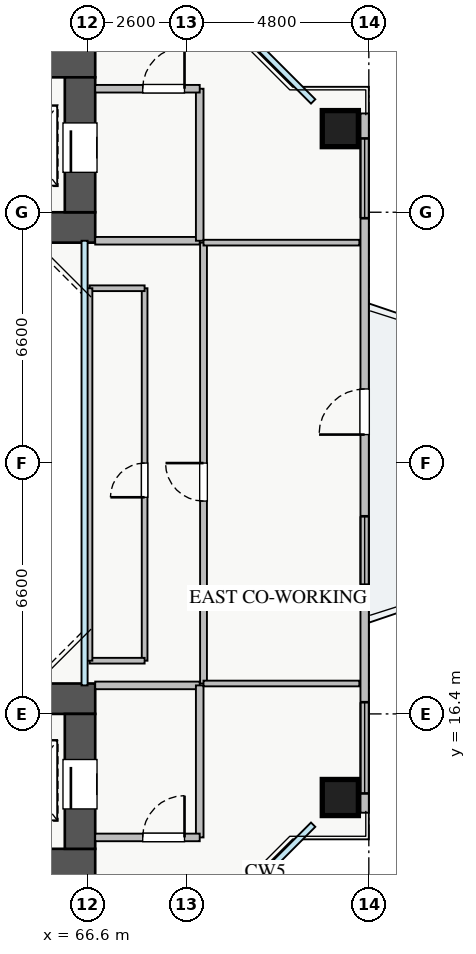
"""IFC4 building model, lengths in metres.
Left out: names, types, materials, properties, quantities, classifications, styles, units other than length and angle.
Written with IfcOpenShell. Run it as: python <this file> out.ifc"""

import sys

from ifc_helpers import new_model, si_unit, direction, frame, frame_2d, origin, origin_2d, place, context, subcontext, project, spatial, rectangle, extrude, source, transform, mapped, element, fill, save


model = new_model("IFC4")
c1 = context("Model", 3, precision=1e-05, world=origin(), true_north=direction((0.0, 1.0)))
c2 = subcontext(c1, "Body", "Model", "MODEL_VIEW")
j1 = project(units=[si_unit("LENGTHUNIT", "METRE"), si_unit("PLANEANGLEUNIT", "RADIAN")], contexts=[c1])
p1 = place(None, origin())
s1 = spatial("IfcSite", under=j1, at=p1, CompositionType="ELEMENT")
p2 = place(p1, origin())
s2 = spatial("IfcBuilding", under=s1, at=p2, CompositionType="ELEMENT")
p3 = place(p2, frame((0.0, 0.0, 66.5)))
s3 = spatial("IfcBuildingStorey", under=s2, at=p3, CompositionType="ELEMENT", Elevation=66.5)
p4 = place(p3, frame((54.2, 29.2, 0.0), z_axis=(0.0, 0.0, 1.0), x_axis=(1.0, 0.0, 0.0)))
e1 = element("IfcWall", 1, at=p4, inside=s3, PredefinedType="SHEAR", context=c2, shape_type="SweptSolid", body=[
    extrude(rectangle(XDim=12.6, YDim=0.8, at=frame_2d((6.3, 0.0))), origin(), (0.0, 0.0, 1.0), 3.25),
])
p5 = place(p3, frame((54.2, 33.55, 0.0), z_axis=(0.0, 0.0, 1.0), x_axis=(1.0, 0.0, 0.0)))
e2 = element("IfcWall", 2, at=p5, inside=s3, PredefinedType="SHEAR", context=c2, shape_type="SweptSolid", body=[
    extrude(rectangle(XDim=12.6, YDim=0.8, at=frame_2d((6.3, 0.0))), origin(), (0.0, 0.0, 1.0), 3.25),
])
p6 = place(p5, frame((8.2, 0.0, 0.0)))
e3 = element("IfcOpeningElement", 3, at=p6, cuts=e2, PredefinedType="OPENING", context=c2, shape_type="SweptSolid", body=[
    extrude(rectangle(XDim=1.1, YDim=2.05, at=frame_2d((0.55, 1.025))), frame((0.0, 0.41, 0.0), z_axis=(0.0, -1.0, 0.0), x_axis=(1.0, 0.0, 0.0)), (0.0, 0.0, 1.0), 0.82),
])
p7 = place(p3, frame((66.4, 29.6, 0.0), z_axis=(0.0, 0.0, 1.0), x_axis=(0.0, 1.0, 0.0)))
e4 = element("IfcWall", 4, at=p7, inside=s3, PredefinedType="SHEAR", context=c2, shape_type="SweptSolid", body=[
    extrude(rectangle(XDim=3.55, YDim=0.8, at=frame_2d((1.775, 0.0))), origin(), (0.0, 0.0, 1.0), 3.25),
])
p8 = place(p7, frame((1.05, 0.0, 0.0)))
e5 = element("IfcOpeningElement", 5, at=p8, cuts=e4, PredefinedType="OPENING", context=c2, shape_type="SweptSolid", body=[
    extrude(rectangle(XDim=1.3, YDim=2.05, at=frame_2d((0.65, 1.025))), frame((0.0, 0.41, 0.0), z_axis=(0.0, -1.0, 0.0), x_axis=(1.0, 0.0, 0.0)), (0.0, 0.0, 1.0), 0.82),
])
p9 = place(p3, frame((54.2, 12.45, 0.0), z_axis=(0.0, 0.0, 1.0), x_axis=(1.0, 0.0, 0.0)))
e6 = element("IfcWall", 6, at=p9, inside=s3, PredefinedType="SHEAR", context=c2, shape_type="SweptSolid", body=[
    extrude(rectangle(XDim=12.6, YDim=0.8, at=frame_2d((6.3, 0.0))), origin(), (0.0, 0.0, 1.0), 3.25),
])
p10 = place(p9, frame((8.2, 0.0, 0.0)))
e7 = element("IfcOpeningElement", 7, at=p10, cuts=e6, PredefinedType="OPENING", context=c2, shape_type="SweptSolid", body=[
    extrude(rectangle(XDim=1.1, YDim=2.05, at=frame_2d((0.55, 1.025))), frame((0.0, 0.41, 0.0), z_axis=(0.0, -1.0, 0.0), x_axis=(1.0, 0.0, 0.0)), (0.0, 0.0, 1.0), 0.82),
])
p11 = place(p3, frame((54.2, 16.8, 0.0), z_axis=(0.0, 0.0, 1.0), x_axis=(1.0, 0.0, 0.0)))
e8 = element("IfcWall", 8, at=p11, inside=s3, PredefinedType="SHEAR", context=c2, shape_type="SweptSolid", body=[
    extrude(rectangle(XDim=12.6, YDim=0.8, at=frame_2d((6.3, 0.0))), origin(), (0.0, 0.0, 1.0), 3.25),
])
p12 = place(p3, frame((66.4, 12.85, 0.0), z_axis=(0.0, 0.0, 1.0), x_axis=(0.0, 1.0, 0.0)))
e9 = element("IfcWall", 9, at=p12, inside=s3, PredefinedType="SHEAR", context=c2, shape_type="SweptSolid", body=[
    extrude(rectangle(XDim=3.55, YDim=0.8, at=frame_2d((1.775, 0.0))), origin(), (0.0, 0.0, 1.0), 3.25),
])
p13 = place(p12, frame((1.05, 0.0, 0.0)))
e10 = element("IfcOpeningElement", 10, at=p13, cuts=e9, PredefinedType="OPENING", context=c2, shape_type="SweptSolid", body=[
    extrude(rectangle(XDim=1.3, YDim=2.05, at=frame_2d((0.65, 1.025))), frame((0.0, 0.41, 0.0), z_axis=(0.0, -1.0, 0.0), x_axis=(1.0, 0.0, 0.0)), (0.0, 0.0, 1.0), 0.82),
])
m1 = source(origin(), c2, "Body", "SweptSolid", [
    extrude(rectangle(XDim=0.95, YDim=0.95, at=origin_2d()), origin(), (0.0, 0.0, 1.0), 3.25),
])
for number, where, z_axis, x_axis in (
    (11, (73.25, 14.2, 0.0), (0.0, 0.0, 1.0), (1.0, 0.0, 0.0)),
    (12, (73.25, 31.8, 0.0), (0.0, 0.0, 1.0), (1.0, 0.0, 0.0)),
):
    element("IfcColumn", number, at=place(p3, frame(where, z_axis=z_axis, x_axis=x_axis)), inside=s3, PredefinedType="COLUMN", context=c2, shape_type="MappedRepresentation", body=[
        mapped(m1, transform((0.0, 0.0, 0.0), x_axis=(1.0, 0.0, 0.0), y_axis=(0.0, 1.0, 0.0), z_axis=(0.0, 0.0, 1.0), scale=1.0)),
    ])
p14 = place(p3, frame((73.89, 13.8, 0.0), z_axis=(0.0, 0.0, 1.0), x_axis=(0.0, 1.0, 0.0)))
e13 = element("IfcWall", 13, at=p14, inside=s3, PredefinedType="STANDARD", context=c2, shape_type="SweptSolid", body=[
    extrude(rectangle(XDim=18.4, YDim=0.22, at=frame_2d((9.2, 0.0))), origin(), (0.0, 0.0, 1.0), 2.61),
])
p15 = place(p14, frame((9.95, 0.0, 0.0)))
e14 = element("IfcOpeningElement", 14, at=p15, cuts=e13, PredefinedType="OPENING", context=c2, shape_type="SweptSolid", body=[
    extrude(rectangle(XDim=1.2, YDim=2.1, at=frame_2d((0.6, 1.05))), frame((0.0, 0.12, 0.0), z_axis=(0.0, -1.0, 0.0), x_axis=(1.0, 0.0, 0.0)), (0.0, 0.0, 1.0), 0.24),
])
p16 = place(p14, frame((0.508, 0.0, 0.9)))
e15 = element("IfcOpeningElement", 15, at=p16, cuts=e13, PredefinedType="OPENING", context=c2, shape_type="SweptSolid", body=[
    extrude(rectangle(XDim=2.4, YDim=1.5, at=frame_2d((1.2, 0.75))), frame((0.0, 0.12, 0.0), z_axis=(0.0, -1.0, 0.0), x_axis=(1.0, 0.0, 0.0)), (0.0, 0.0, 1.0), 0.24),
])
p17 = place(p14, frame((6.0, 0.0, 0.9)))
e16 = element("IfcOpeningElement", 16, at=p17, cuts=e13, PredefinedType="OPENING", context=c2, shape_type="SweptSolid", body=[
    extrude(rectangle(XDim=1.8, YDim=1.45, at=frame_2d((0.9, 0.725))), frame((0.0, 0.12, 0.0), z_axis=(0.0, -1.0, 0.0), x_axis=(1.0, 0.0, 0.0)), (0.0, 0.0, 1.0), 0.24),
])
p18 = place(p14, frame((15.643, 0.0, 0.9)))
e17 = element("IfcOpeningElement", 17, at=p18, cuts=e13, PredefinedType="OPENING", context=c2, shape_type="SweptSolid", body=[
    extrude(rectangle(XDim=2.1, YDim=1.5, at=frame_2d((1.05, 0.75))), frame((0.0, 0.12, 0.0), z_axis=(0.0, -1.0, 0.0), x_axis=(1.0, 0.0, 0.0)), (0.0, 0.0, 1.0), 0.24),
])
p19 = place(p3, frame((66.8, 28.85, 0.0), z_axis=(0.0, 0.0, 1.0), x_axis=(1.0, 0.0, 0.0)))
e18 = element("IfcWall", 18, at=p19, inside=s3, PredefinedType="PARTITIONING", context=c2, shape_type="SweptSolid", body=[
    extrude(rectangle(XDim=2.75, YDim=0.2, at=frame_2d((1.375, 0.0))), origin(), (0.0, 0.0, 1.0), 3.07),
])
p20 = place(p3, frame((69.55, 28.85, 0.0), z_axis=(0.0, 0.0, 1.0), x_axis=(0.0, 1.0, 0.0)))
e19 = element("IfcWall", 19, at=p20, inside=s3, PredefinedType="PARTITIONING", context=c2, shape_type="SweptSolid", body=[
    extrude(rectangle(XDim=4.0, YDim=0.2, at=frame_2d((2.0, 0.0))), origin(), (0.0, 0.0, 1.0), 2.615),
])
p21 = place(p3, frame((66.8, 32.85, 0.0), z_axis=(0.0, 0.0, 1.0), x_axis=(1.0, 0.0, 0.0)))
e20 = element("IfcWall", 20, at=p21, inside=s3, PredefinedType="PARTITIONING", context=c2, shape_type="SweptSolid", body=[
    extrude(rectangle(XDim=2.75, YDim=0.2, at=frame_2d((1.375, 0.0))), origin(), (0.0, 0.0, 1.0), 3.07),
])
p22 = place(p21, frame((1.25, 0.0, 0.0)))
e21 = element("IfcOpeningElement", 21, at=p22, cuts=e20, PredefinedType="OPENING", context=c2, shape_type="SweptSolid", body=[
    extrude(rectangle(XDim=1.1, YDim=2.05, at=frame_2d((0.55, 1.025))), frame((0.0, 0.11, 0.0), z_axis=(0.0, -1.0, 0.0), x_axis=(1.0, 0.0, 0.0)), (0.0, 0.0, 1.0), 0.22),
])
p23 = place(p3, frame((66.8, 17.15, 0.0), z_axis=(0.0, 0.0, 1.0), x_axis=(1.0, 0.0, 0.0)))
e22 = element("IfcWall", 22, at=p23, inside=s3, PredefinedType="PARTITIONING", context=c2, shape_type="SweptSolid", body=[
    extrude(rectangle(XDim=2.75, YDim=0.2, at=frame_2d((1.375, 0.0))), origin(), (0.0, 0.0, 1.0), 3.07),
])
p24 = place(p3, frame((69.55, 13.15, 0.0), z_axis=(0.0, 0.0, 1.0), x_axis=(0.0, 1.0, 0.0)))
e23 = element("IfcWall", 23, at=p24, inside=s3, PredefinedType="PARTITIONING", context=c2, shape_type="SweptSolid", body=[
    extrude(rectangle(XDim=4.0, YDim=0.2, at=frame_2d((2.0, 0.0))), origin(), (0.0, 0.0, 1.0), 2.615),
])
p25 = place(p3, frame((66.8, 13.15, 0.0), z_axis=(0.0, 0.0, 1.0), x_axis=(1.0, 0.0, 0.0)))
e24 = element("IfcWall", 24, at=p25, inside=s3, PredefinedType="PARTITIONING", context=c2, shape_type="SweptSolid", body=[
    extrude(rectangle(XDim=2.75, YDim=0.2, at=frame_2d((1.375, 0.0))), origin(), (0.0, 0.0, 1.0), 3.07),
])
p26 = place(p25, frame((1.25, 0.0, 0.0)))
e25 = element("IfcOpeningElement", 25, at=p26, cuts=e24, PredefinedType="OPENING", context=c2, shape_type="SweptSolid", body=[
    extrude(rectangle(XDim=1.1, YDim=2.05, at=frame_2d((0.55, 1.025))), frame((0.0, 0.11, 0.0), z_axis=(0.0, -1.0, 0.0), x_axis=(1.0, 0.0, 0.0)), (0.0, 0.0, 1.0), 0.22),
])
p27 = place(p3, frame((69.65, 17.2, 0.0), z_axis=(0.0, 0.0, 1.0), x_axis=(0.0, 1.0, 0.0)))
e26 = element("IfcWall", 26, at=p27, inside=s3, PredefinedType="PARTITIONING", context=c2, shape_type="SweptSolid", body=[
    extrude(rectangle(XDim=11.6, YDim=0.18, at=frame_2d((5.8, 0.0))), origin(), (0.0, 0.0, 1.0), 3.07),
])
p28 = place(p27, frame((4.8, 0.0, 0.0)))
e27 = element("IfcOpeningElement", 27, at=p28, cuts=e26, PredefinedType="OPENING", context=c2, shape_type="SweptSolid", body=[
    extrude(rectangle(XDim=1.0, YDim=2.05, at=frame_2d((0.5, 1.025))), frame((0.0, 0.1, 0.0), z_axis=(0.0, -1.0, 0.0), x_axis=(1.0, 0.0, 0.0)), (0.0, 0.0, 1.0), 0.2),
])
for number, where, z_axis, x_axis in (
    (28, (69.65, 17.2, 0.0), (0.0, 0.0, 1.0), (1.0, 0.0, 0.0)),
    (29, (69.65, 28.8, 0.0), (0.0, 0.0, 1.0), (1.0, 0.0, 0.0)),
):
    element("IfcWall", number, at=place(p3, frame(where, z_axis=z_axis, x_axis=x_axis)), inside=s3, PredefinedType="PARTITIONING", context=c2, shape_type="SweptSolid", body=[
        extrude(rectangle(XDim=4.1, YDim=0.15, at=frame_2d((2.05, 0.0))), origin(), (0.0, 0.0, 1.0), 3.07),
    ])
p29 = place(p3, frame((68.1, 17.8, 0.0), z_axis=(0.0, 0.0, 1.0), x_axis=(0.0, 1.0, 0.0)))
e30 = element("IfcWall", 30, at=p29, inside=s3, PredefinedType="PARTITIONING", context=c2, shape_type="SweptSolid", body=[
    extrude(rectangle(XDim=9.8, YDim=0.15, at=frame_2d((4.9, 0.0))), origin(), (0.0, 0.0, 1.0), 3.07),
])
p30 = place(p29, frame((4.3, 0.0, 0.0)))
e31 = element("IfcOpeningElement", 31, at=p30, cuts=e30, PredefinedType="OPENING", context=c2, shape_type="SweptSolid", body=[
    extrude(rectangle(XDim=0.9, YDim=2.05, at=frame_2d((0.45, 1.025))), frame((0.0, 0.085, 0.0), z_axis=(0.0, -1.0, 0.0), x_axis=(1.0, 0.0, 0.0)), (0.0, 0.0, 1.0), 0.17),
])
p31 = place(p3, frame((66.65, 27.6, 0.0), z_axis=(0.0, 0.0, 1.0), x_axis=(1.0, 0.0, 0.0)))
e32 = element("IfcWall", 32, at=p31, inside=s3, PredefinedType="PARTITIONING", context=c2, shape_type="SweptSolid", body=[
    extrude(rectangle(XDim=1.45, YDim=0.15, at=frame_2d((0.725, 0.0))), origin(), (0.0, 0.0, 1.0), 2.815),
])
p32 = place(p3, frame((66.65, 17.8, 0.0), z_axis=(0.0, 0.0, 1.0), x_axis=(1.0, 0.0, 0.0)))
e33 = element("IfcWall", 33, at=p32, inside=s3, PredefinedType="PARTITIONING", context=c2, shape_type="SweptSolid", body=[
    extrude(rectangle(XDim=1.45, YDim=0.15, at=frame_2d((0.725, 0.0))), origin(), (0.0, 0.0, 1.0), 3.07),
])
p33 = place(p3, frame((66.65, 17.8, 0.0), z_axis=(0.0, 0.0, 1.0), x_axis=(0.0, 1.0, 0.0)))
e34 = element("IfcWall", 34, at=p33, inside=s3, PredefinedType="PARTITIONING", context=c2, shape_type="SweptSolid", body=[
    extrude(rectangle(XDim=9.8, YDim=0.15, at=frame_2d((4.9, 0.0))), origin(), (0.0, 0.0, 1.0), 2.215),
])
m2 = source(origin(), c2, "Body", "SweptSolid", [
    extrude(rectangle(XDim=1.2, YDim=2.1, at=frame_2d((0.6, 1.05))), frame((0.0, 0.025, 0.0), z_axis=(0.0, -1.0, 0.0), x_axis=(1.0, 0.0, 0.0)), (0.0, 0.0, 1.0), 0.05),
])
p34 = place(p15, origin())
e35 = element("IfcDoor", 35, at=p34, inside=s3, OperationType="SINGLE_SWING_LEFT", PredefinedType="DOOR", context=c2, shape_type="MappedRepresentation", body=[
    mapped(m2, transform((0.0, 0.0, 0.0), x_axis=(1.0, 0.0, 0.0), y_axis=(0.0, 1.0, 0.0), z_axis=(0.0, 0.0, 1.0), scale=1.0)),
])
fill(e14, e35)
m3 = source(origin(), c2, "Body", "SweptSolid", [
    extrude(rectangle(XDim=2.4, YDim=1.5, at=frame_2d((1.2, 0.75))), frame((0.0, 0.03, 0.0), z_axis=(0.0, -1.0, 0.0), x_axis=(1.0, 0.0, 0.0)), (0.0, 0.0, 1.0), 0.06),
])
p35 = place(p16, origin())
e36 = element("IfcWindow", 36, at=p35, inside=s3, PartitioningType="TRIPLE_PANEL_VERTICAL", PredefinedType="WINDOW", context=c2, shape_type="MappedRepresentation", body=[
    mapped(m3, transform((0.0, 0.0, 0.0), x_axis=(1.0, 0.0, 0.0), y_axis=(0.0, 1.0, 0.0), z_axis=(0.0, 0.0, 1.0), scale=1.0)),
])
fill(e15, e36)
m4 = source(origin(), c2, "Body", "SweptSolid", [
    extrude(rectangle(XDim=1.8, YDim=1.45, at=frame_2d((0.9, 0.725))), frame((0.0, 0.03, 0.0), z_axis=(0.0, -1.0, 0.0), x_axis=(1.0, 0.0, 0.0)), (0.0, 0.0, 1.0), 0.06),
])
p36 = place(p17, origin())
e37 = element("IfcWindow", 37, at=p36, inside=s3, PartitioningType="DOUBLE_PANEL_VERTICAL", PredefinedType="WINDOW", context=c2, shape_type="MappedRepresentation", body=[
    mapped(m4, transform((0.0, 0.0, 0.0), x_axis=(1.0, 0.0, 0.0), y_axis=(0.0, 1.0, 0.0), z_axis=(0.0, 0.0, 1.0), scale=1.0)),
])
fill(e16, e37)
m5 = source(origin(), c2, "Body", "SweptSolid", [
    extrude(rectangle(XDim=2.1, YDim=1.5, at=frame_2d((1.05, 0.75))), frame((0.0, 0.03, 0.0), z_axis=(0.0, -1.0, 0.0), x_axis=(1.0, 0.0, 0.0)), (0.0, 0.0, 1.0), 0.06),
])
p37 = place(p18, origin())
e38 = element("IfcWindow", 38, at=p37, inside=s3, PartitioningType="TRIPLE_PANEL_VERTICAL", PredefinedType="WINDOW", context=c2, shape_type="MappedRepresentation", body=[
    mapped(m5, transform((0.0, 0.0, 0.0), x_axis=(1.0, 0.0, 0.0), y_axis=(0.0, 1.0, 0.0), z_axis=(0.0, 0.0, 1.0), scale=1.0)),
])
fill(e17, e38)
m6 = source(origin(), c2, "Body", "SweptSolid", [
    extrude(rectangle(XDim=1.3, YDim=2.05, at=frame_2d((0.65, 1.025))), frame((0.0, 0.025, 0.0), z_axis=(0.0, -1.0, 0.0), x_axis=(1.0, 0.0, 0.0)), (0.0, 0.0, 1.0), 0.05),
])
p38 = place(p8, origin())
e39 = element("IfcDoor", 39, at=p38, inside=s3, OperationType="SLIDING_TO_LEFT", PredefinedType="DOOR", context=c2, shape_type="MappedRepresentation", body=[
    mapped(m6, transform((0.0, 0.0, 0.0), x_axis=(1.0, 0.0, 0.0), y_axis=(0.0, 1.0, 0.0), z_axis=(0.0, 0.0, 1.0), scale=1.0)),
])
fill(e5, e39)
p39 = place(p13, origin())
e40 = element("IfcDoor", 40, at=p39, inside=s3, OperationType="SLIDING_TO_RIGHT", PredefinedType="DOOR", context=c2, shape_type="MappedRepresentation", body=[
    mapped(m6, transform((0.0, 0.0, 0.0), x_axis=(1.0, 0.0, 0.0), y_axis=(0.0, 1.0, 0.0), z_axis=(0.0, 0.0, 1.0), scale=1.0)),
])
fill(e10, e40)
m7 = source(origin(), c2, "Body", "SweptSolid", [
    extrude(rectangle(XDim=1.1, YDim=2.05, at=frame_2d((0.55, 1.025))), frame((0.0, 0.025, 0.0), z_axis=(0.0, -1.0, 0.0), x_axis=(1.0, 0.0, 0.0)), (0.0, 0.0, 1.0), 0.05),
])
p40 = place(p22, origin())
e41 = element("IfcDoor", 41, at=p40, inside=s3, OperationType="SINGLE_SWING_RIGHT", PredefinedType="DOOR", context=c2, shape_type="MappedRepresentation", body=[
    mapped(m7, transform((0.0, 0.0, 0.0), x_axis=(1.0, 0.0, 0.0), y_axis=(0.0, 1.0, 0.0), z_axis=(0.0, 0.0, 1.0), scale=1.0)),
])
fill(e21, e41)
p41 = place(p26, origin())
e42 = element("IfcDoor", 42, at=p41, inside=s3, OperationType="SINGLE_SWING_RIGHT", PredefinedType="DOOR", context=c2, shape_type="MappedRepresentation", body=[
    mapped(m7, transform((0.0, 0.0, 0.0), x_axis=(1.0, 0.0, 0.0), y_axis=(0.0, 1.0, 0.0), z_axis=(0.0, 0.0, 1.0), scale=1.0)),
])
fill(e25, e42)
m8 = source(origin(), c2, "Body", "SweptSolid", [
    extrude(rectangle(XDim=1.0, YDim=2.05, at=frame_2d((0.5, 1.025))), frame((0.0, 0.025, 0.0), z_axis=(0.0, -1.0, 0.0), x_axis=(1.0, 0.0, 0.0)), (0.0, 0.0, 1.0), 0.05),
])
p42 = place(p28, origin())
e43 = element("IfcDoor", 43, at=p42, inside=s3, OperationType="SINGLE_SWING_RIGHT", PredefinedType="DOOR", context=c2, shape_type="MappedRepresentation", body=[
    mapped(m8, transform((0.0, 0.0, 0.0), x_axis=(1.0, 0.0, 0.0), y_axis=(0.0, 1.0, 0.0), z_axis=(0.0, 0.0, 1.0), scale=1.0)),
])
fill(e27, e43)
m9 = source(origin(), c2, "Body", "SweptSolid", [
    extrude(rectangle(XDim=0.9, YDim=2.05, at=frame_2d((0.45, 1.025))), frame((0.0, 0.025, 0.0), z_axis=(0.0, -1.0, 0.0), x_axis=(1.0, 0.0, 0.0)), (0.0, 0.0, 1.0), 0.05),
])
p43 = place(p30, origin())
e44 = element("IfcDoor", 44, at=p43, inside=s3, OperationType="SINGLE_SWING_LEFT", PredefinedType="DOOR", context=c2, shape_type="MappedRepresentation", body=[
    mapped(m9, transform((0.0, 0.0, 0.0), x_axis=(1.0, 0.0, 0.0), y_axis=(0.0, 1.0, 0.0), z_axis=(0.0, 0.0, 1.0), scale=1.0)),
])
fill(e31, e44)
save(model, sys.argv[1])
